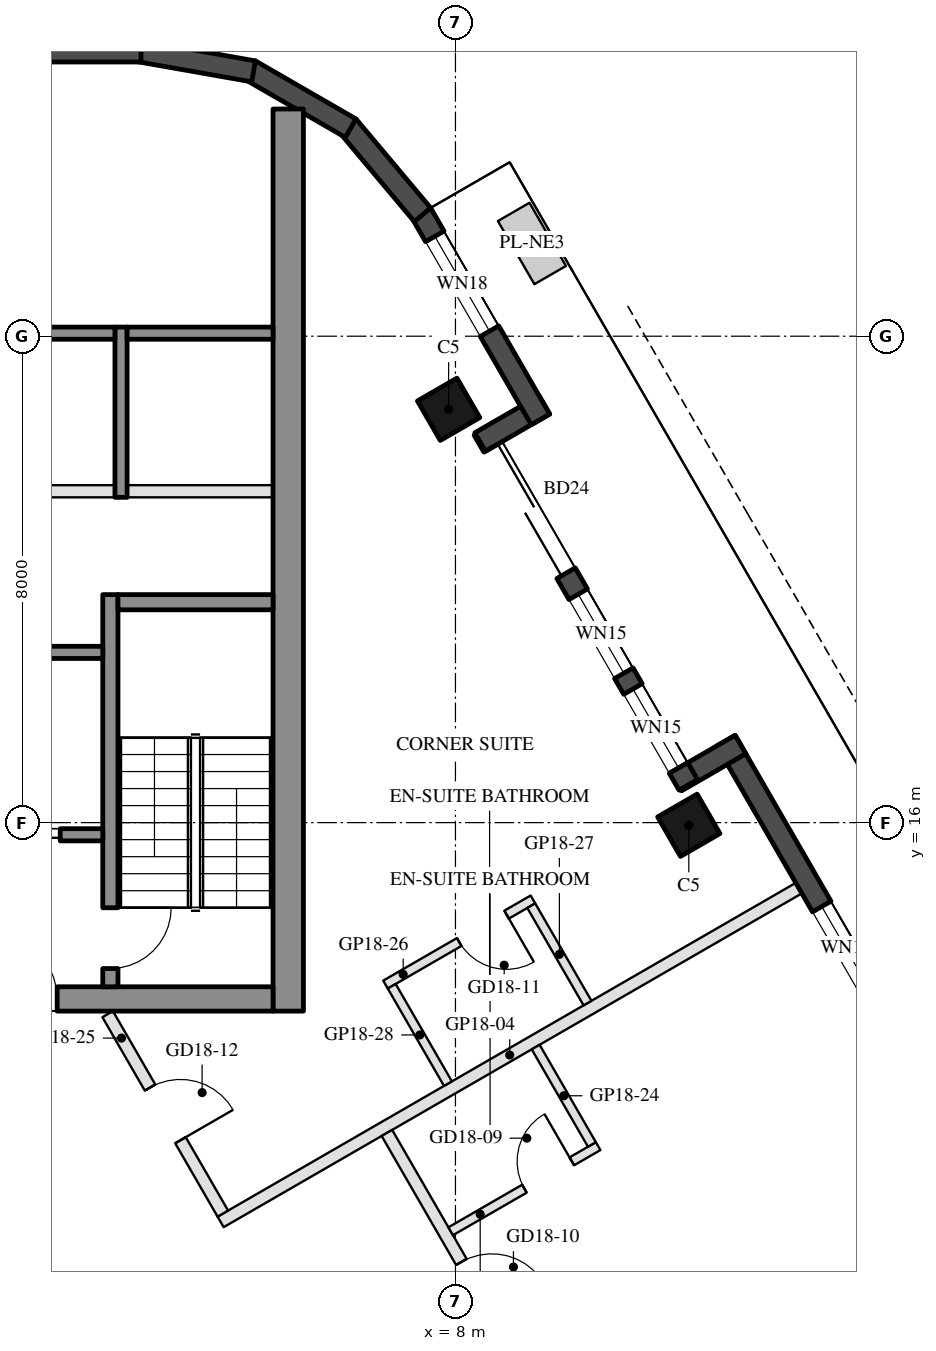
"""IFC4 building model, lengths in metres.
Left out: names, types, materials, properties, quantities, classifications, styles, units other than length and angle.
Written with IfcOpenShell. Run it as: python <this file> out.ifc"""

import sys

from ifc_helpers import new_model, si_unit, direction, frame, frame_2d, origin, origin_2d, place, context, subcontext, project, spatial, rectangle, hollow_rectangle, extrude, element, fill, save


model = new_model("IFC4")
c1 = context("Model", 3, precision=1e-05, world=origin(), true_north=direction((0.0, 1.0)))
c2 = subcontext(c1, "Body", "Model", "MODEL_VIEW")
j1 = project(units=[si_unit("LENGTHUNIT", "METRE"), si_unit("PLANEANGLEUNIT", "RADIAN")], contexts=[c1])
p1 = place(None, origin())
s1 = spatial("IfcSite", under=j1, at=p1, CompositionType="ELEMENT")
p2 = place(p1, origin())
s2 = spatial("IfcBuilding", under=s1, at=p2, CompositionType="ELEMENT")
p3 = place(p2, frame((0.0, 0.0, 194.7)))
s3 = spatial("IfcBuildingStorey", under=s2, at=p3, CompositionType="ELEMENT", Elevation=194.7)
for number, where, z_axis, x_axis in (
    (1, (11.838, 15.957, 0.0), (0.0, 0.0, 1.0), (-0.5, 0.866, 0.0)),
    (2, (7.888, 22.798, 0.0), (0.0, 0.0, 1.0), (-0.5, 0.866, 0.0)),
):
    element("IfcColumn", number, at=place(p3, frame(where, z_axis=z_axis, x_axis=x_axis)), inside=s3, PredefinedType="COLUMN", context=c2, shape_type="SweptSolid", body=[
        extrude(hollow_rectangle(XDim=0.75, YDim=0.75, WallThickness=0.035, at=origin_2d()), origin(), (0.0, 0.0, 1.0), 3.7),
    ])
p4 = place(p3, frame((17.299, 8.948, 0.0), z_axis=(0.0, 0.0, 1.0), x_axis=(-0.500010041276, 0.866019606374, 0.0)))
e3 = element("IfcWall", 3, at=p4, inside=s3, PredefinedType="SOLIDWALL", context=c2, shape_type="SweptSolid", body=[
    extrude(rectangle(XDim=9.7, YDim=0.35, at=frame_2d((4.85, 0.0))), origin(), (0.0, 0.0, 1.0), 3.55),
])
p5 = place(p4, frame((1.737, 0.0, 0.0)))
e4 = element("IfcOpeningElement", 4, at=p5, cuts=e3, PredefinedType="OPENING", context=c2, shape_type="SweptSolid", body=[
    extrude(rectangle(XDim=2.4, YDim=2.4, at=frame_2d((1.2, 1.2))), frame((0.0, 0.185, 0.0), z_axis=(0.0, -1.0, 0.0), x_axis=(1.0, 0.0, 0.0)), (0.0, 0.0, 1.0), 0.37),
])
p6 = place(p4, frame((4.949, 0.0, 0.3)))
e5 = element("IfcOpeningElement", 5, at=p6, cuts=e3, PredefinedType="OPENING", context=c2, shape_type="SweptSolid", body=[
    extrude(rectangle(XDim=1.6, YDim=2.65, at=frame_2d((0.8, 1.325))), frame((0.0, 0.185, 0.0), z_axis=(0.0, -1.0, 0.0), x_axis=(1.0, 0.0, 0.0)), (0.0, 0.0, 1.0), 0.37),
])
p7 = place(p3, frame((12.688, 17.284, 0.0), z_axis=(0.0, 0.0, 1.0), x_axis=(-0.865955602162, -0.500120880472, 0.0)))
e6 = element("IfcWall", 6, at=p7, inside=s3, PredefinedType="SOLIDWALL", context=c2, shape_type="SweptSolid", body=[
    extrude(rectangle(XDim=1.22, YDim=0.35, at=frame_2d((0.61, 0.0))), origin(), (0.0, 0.0, 1.0), 3.55),
])
p8 = place(p3, frame((11.829, 16.621, 0.0), z_axis=(0.0, 0.0, 1.0), x_axis=(-0.500003597184, 0.866023326939, 0.0)))
e7 = element("IfcWall", 7, at=p8, inside=s3, PredefinedType="SOLIDWALL", context=c2, shape_type="SweptSolid", body=[
    extrude(rectangle(XDim=6.74, YDim=0.35, at=frame_2d((3.37, 0.0))), origin(), (0.0, 0.0, 1.0), 3.55),
])
p9 = place(p8, frame((4.02, 0.0, 0.0)))
e8 = element("IfcOpeningElement", 8, at=p9, cuts=e7, PredefinedType="OPENING", context=c2, shape_type="SweptSolid", body=[
    extrude(rectangle(XDim=2.4, YDim=2.4, at=frame_2d((1.2, 1.2))), frame((0.0, 0.185, 0.0), z_axis=(0.0, -1.0, 0.0), x_axis=(1.0, 0.0, 0.0)), (0.0, 0.0, 1.0), 0.37),
])
p10 = place(p8, frame((0.32, 0.0, 0.3)))
e9 = element("IfcOpeningElement", 9, at=p10, cuts=e7, PredefinedType="OPENING", context=c2, shape_type="SweptSolid", body=[
    extrude(rectangle(XDim=1.5, YDim=2.65, at=frame_2d((0.75, 1.325))), frame((0.0, 0.185, 0.0), z_axis=(0.0, -1.0, 0.0), x_axis=(1.0, 0.0, 0.0)), (0.0, 0.0, 1.0), 0.37),
])
p11 = place(p8, frame((2.12, 0.0, 0.3)))
e10 = element("IfcOpeningElement", 10, at=p11, cuts=e7, PredefinedType="OPENING", context=c2, shape_type="SweptSolid", body=[
    extrude(rectangle(XDim=1.5, YDim=2.65, at=frame_2d((0.75, 1.325))), frame((0.0, 0.185, 0.0), z_axis=(0.0, -1.0, 0.0), x_axis=(1.0, 0.0, 0.0)), (0.0, 0.0, 1.0), 0.37),
])
p12 = place(p3, frame((8.406, 22.26, 0.0), z_axis=(0.0, 0.0, 1.0), x_axis=(0.865955602162, 0.500120880472, 0.0)))
e11 = element("IfcWall", 11, at=p12, inside=s3, PredefinedType="SOLIDWALL", context=c2, shape_type="SweptSolid", body=[
    extrude(rectangle(XDim=1.22, YDim=0.35, at=frame_2d((0.61, 0.0))), origin(), (0.0, 0.0, 1.0), 3.55),
])
p13 = place(p3, frame((9.398, 22.631, 0.0), z_axis=(0.0, 0.0, 1.0), x_axis=(-0.499954521343, 0.866051659307, 0.0)))
e12 = element("IfcWall", 12, at=p13, inside=s3, PredefinedType="SOLIDWALL", context=c2, shape_type="SweptSolid", body=[
    extrude(rectangle(XDim=3.916, YDim=0.35, at=frame_2d((1.958, 0.0))), origin(), (0.0, 0.0, 1.0), 3.55),
])
p14 = place(p13, frame((1.676, 0.0, 0.3)))
e13 = element("IfcOpeningElement", 13, at=p14, cuts=e12, PredefinedType="OPENING", context=c2, shape_type="SweptSolid", body=[
    extrude(rectangle(XDim=1.8, YDim=2.65, at=frame_2d((0.9, 1.325))), frame((0.0, 0.185, 0.0), z_axis=(0.0, -1.0, 0.0), x_axis=(1.0, 0.0, 0.0)), (0.0, 0.0, 1.0), 0.37),
])
p15 = place(p3, frame((7.458, 25.998, 0.0), z_axis=(0.0, 0.0, 1.0), x_axis=(-0.642808304945, 0.766027077259, 0.0)))
e14 = element("IfcWall", 14, at=p15, inside=s3, PredefinedType="SOLIDWALL", context=c2, shape_type="SweptSolid", body=[
    extrude(rectangle(XDim=1.91, YDim=0.35, at=frame_2d((0.955, 0.0))), origin(), (0.0, 0.0, 1.0), 3.55),
])
for number, where, z_axis, x_axis in (
    (15, (6.277, 27.422, 0.0), (0.0, 0.0, 1.0), (-0.866, 0.5, 0.0)),
    (16, (4.68, 28.356, 0.0), (0.0, 0.0, 1.0), (-0.985, 0.174, 0.0)),
):
    element("IfcWall", number, at=place(p3, frame(where, z_axis=z_axis, x_axis=x_axis)), inside=s3, PredefinedType="SOLIDWALL", context=c2, shape_type="SweptSolid", body=[
        extrude(rectangle(XDim=1.91, YDim=0.35, at=frame_2d((0.955, 0.0))), origin(), (0.0, 0.0, 1.0), 3.55),
    ])
p16 = place(p3, frame((2.829, 28.685, 0.0), z_axis=(0.0, 0.0, 1.0), x_axis=(-1.0, 0.0, 0.0)))
e17 = element("IfcWall", 17, at=p16, inside=s3, PredefinedType="SOLIDWALL", context=c2, shape_type="SweptSolid", body=[
    extrude(rectangle(XDim=5.658, YDim=0.35, at=frame_2d((2.829, 0.0))), origin(), (0.0, 0.0, 1.0), 3.55),
])
p17 = place(p3, frame((5.25, 12.9, 0.0), z_axis=(0.0, 0.0, 1.0), x_axis=(0.0, 1.0, 0.0)))
e18 = element("IfcWall", 18, at=p17, inside=s3, PredefinedType="SHEAR", context=c2, shape_type="SweptSolid", body=[
    extrude(rectangle(XDim=14.837, YDim=0.5, at=frame_2d((7.418, 0.0))), origin(), (0.0, 0.0, 1.0), 3.5),
])
p18 = place(p3, frame((5.0, 13.1, 0.0), z_axis=(0.0, 0.0, 1.0), x_axis=(-1.0, 0.0, 0.0)))
e19 = element("IfcWall", 19, at=p18, inside=s3, PredefinedType="SHEAR", context=c2, shape_type="SweptSolid", body=[
    extrude(rectangle(XDim=10.0, YDim=0.4, at=frame_2d((5.0, 0.0))), origin(), (0.0, 0.0, 1.0), 3.5),
])
p19 = place(p18, frame((3.55, 0.0, 0.0)))
e20 = element("IfcOpeningElement", 20, at=p19, cuts=e19, PredefinedType="OPENING", context=c2, shape_type="SweptSolid", body=[
    extrude(rectangle(XDim=1.1, YDim=2.1, at=frame_2d((0.55, 1.05))), frame((0.0, 0.21, 0.0), z_axis=(0.0, -1.0, 0.0), x_axis=(1.0, 0.0, 0.0)), (0.0, 0.0, 1.0), 0.42),
])
p20 = place(p18, frame((5.85, 0.0, 0.0)))
e21 = element("IfcOpeningElement", 21, at=p20, cuts=e19, PredefinedType="OPENING", context=c2, shape_type="SweptSolid", body=[
    extrude(rectangle(XDim=1.4, YDim=2.1, at=frame_2d((0.7, 1.05))), frame((0.0, 0.21, 0.0), z_axis=(0.0, -1.0, 0.0), x_axis=(1.0, 0.0, 0.0)), (0.0, 0.0, 1.0), 0.42),
])
p21 = place(p3, frame((2.325, 13.3, 0.0), z_axis=(0.0, 0.0, 1.0), x_axis=(0.0, 1.0, 0.0)))
e22 = element("IfcWall", 22, at=p21, inside=s3, PredefinedType="SHEAR", context=c2, shape_type="SweptSolid", body=[
    extrude(rectangle(XDim=6.45, YDim=0.25, at=frame_2d((3.225, 0.0))), origin(), (0.0, 0.0, 1.0), 3.5),
])
p22 = place(p21, frame((0.3, 0.0, 0.0)))
e23 = element("IfcOpeningElement", 23, at=p22, cuts=e22, PredefinedType="OPENING", context=c2, shape_type="SweptSolid", body=[
    extrude(rectangle(XDim=1.0, YDim=2.1, at=frame_2d((0.5, 1.05))), frame((0.0, 0.135, 0.0), z_axis=(0.0, -1.0, 0.0), x_axis=(1.0, 0.0, 0.0)), (0.0, 0.0, 1.0), 0.27),
])
p23 = place(p3, frame((5.0, 19.625, 0.0), z_axis=(0.0, 0.0, 1.0), x_axis=(-1.0, 0.0, 0.0)))
e24 = element("IfcWall", 24, at=p23, inside=s3, PredefinedType="SHEAR", context=c2, shape_type="SweptSolid", body=[
    extrude(rectangle(XDim=2.55, YDim=0.25, at=frame_2d((1.275, 0.0))), origin(), (0.0, 0.0, 1.0), 3.5),
])
p24 = place(p3, frame((2.2, 18.8, 0.0), z_axis=(0.0, 0.0, 1.0), x_axis=(-1.0, 0.0, 0.0)))
e25 = element("IfcWall", 25, at=p24, inside=s3, PredefinedType="SHEAR", context=c2, shape_type="SweptSolid", body=[
    extrude(rectangle(XDim=2.8, YDim=0.2, at=frame_2d((1.4, 0.0))), origin(), (0.0, 0.0, 1.0), 3.5),
])
p25 = place(p3, frame((2.2, 15.8, 0.0), z_axis=(0.0, 0.0, 1.0), x_axis=(-1.0, 0.0, 0.0)))
e26 = element("IfcWall", 26, at=p25, inside=s3, PredefinedType="SHEAR", context=c2, shape_type="SweptSolid", body=[
    extrude(rectangle(XDim=2.8, YDim=0.2, at=frame_2d((1.4, 0.0))), origin(), (0.0, 0.0, 1.0), 3.5),
])
p26 = place(p25, frame((0.7, 0.0, 0.0)))
e27 = element("IfcOpeningElement", 27, at=p26, cuts=e26, PredefinedType="OPENING", context=c2, shape_type="SweptSolid", body=[
    extrude(rectangle(XDim=1.2, YDim=2.1, at=frame_2d((0.6, 1.05))), frame((0.0, 0.11, 0.0), z_axis=(0.0, -1.0, 0.0), x_axis=(1.0, 0.0, 0.0)), (0.0, 0.0, 1.0), 0.22),
])
p27 = place(p3, frame((2.5, 21.35, 0.0), z_axis=(0.0, 0.0, 1.0), x_axis=(0.0, 1.0, 0.0)))
e28 = element("IfcWall", 28, at=p27, inside=s3, PredefinedType="SHEAR", context=c2, shape_type="SweptSolid", body=[
    extrude(rectangle(XDim=2.8, YDim=0.2, at=frame_2d((1.4, 0.0))), origin(), (0.0, 0.0, 1.0), 3.5),
])
p28 = place(p3, frame((5.0, 24.05, 0.0), z_axis=(0.0, 0.0, 1.0), x_axis=(-1.0, 0.0, 0.0)))
e29 = element("IfcWall", 29, at=p28, inside=s3, PredefinedType="SHEAR", context=c2, shape_type="SweptSolid", body=[
    extrude(rectangle(XDim=2.4, YDim=0.2, at=frame_2d((1.2, 0.0))), origin(), (0.0, 0.0, 1.0), 3.5),
])
p29 = place(p3, frame((2.4, 24.05, 0.0), z_axis=(0.0, 0.0, 1.0), x_axis=(-1.0, 0.0, 0.0)))
e30 = element("IfcWall", 30, at=p29, inside=s3, PredefinedType="SHEAR", context=c2, shape_type="SweptSolid", body=[
    extrude(rectangle(XDim=2.8, YDim=0.2, at=frame_2d((1.4, 0.0))), origin(), (0.0, 0.0, 1.0), 3.5),
])
p30 = place(p3, frame((5.0, 21.45, 0.0), z_axis=(0.0, 0.0, 1.0), x_axis=(-1.0, 0.0, 0.0)))
e31 = element("IfcWall", 31, at=p30, inside=s3, PredefinedType="PARTITIONING", context=c2, shape_type="SweptSolid", body=[
    extrude(rectangle(XDim=2.4, YDim=0.2, at=frame_2d((1.2, 0.0))), origin(), (0.0, 0.0, 1.0), 3.5),
])
p31 = place(p3, frame((2.4, 21.45, 0.0), z_axis=(0.0, 0.0, 1.0), x_axis=(-1.0, 0.0, 0.0)))
e32 = element("IfcWall", 32, at=p31, inside=s3, PredefinedType="PARTITIONING", context=c2, shape_type="SweptSolid", body=[
    extrude(rectangle(XDim=2.8, YDim=0.2, at=frame_2d((1.4, 0.0))), origin(), (0.0, 0.0, 1.0), 3.5),
])
p32 = place(p3, frame((13.647, 14.923, 0.0), z_axis=(0.0, 0.0, 1.0), x_axis=(-0.866027479907, -0.499996404033, 0.0)))
e33 = element("IfcWall", 33, at=p32, inside=s3, PredefinedType="PARTITIONING", context=c2, shape_type="SweptSolid", body=[
    extrude(rectangle(XDim=10.98, YDim=0.2, at=frame_2d((5.49, 0.0))), origin(), (0.0, 0.0, 1.0), 3.06),
])
p33 = place(p3, frame((6.873, 10.896, 0.0), z_axis=(0.0, 0.0, 1.0), x_axis=(0.499987518031, -0.866032610133, 0.0)))
e34 = element("IfcWall", 34, at=p33, inside=s3, PredefinedType="PARTITIONING", context=c2, shape_type="SweptSolid", body=[
    extrude(rectangle(XDim=9.886, YDim=0.2, at=frame_2d((4.943, 0.0))), origin(), (0.0, 0.0, 1.0), 2.95),
])
p34 = place(p33, frame((2.45, 0.0, 0.0)))
e35 = element("IfcOpeningElement", 35, at=p34, cuts=e34, PredefinedType="OPENING", context=c2, shape_type="SweptSolid", body=[
    extrude(rectangle(XDim=1.0, YDim=2.1, at=frame_2d((0.5, 1.05))), frame((0.0, 0.11, 0.0), z_axis=(0.0, -1.0, 0.0), x_axis=(1.0, 0.0, 0.0)), (0.0, 0.0, 1.0), 0.22),
])
p35 = place(p3, frame((7.922, 9.279, 0.0), z_axis=(0.0, 0.0, 1.0), x_axis=(0.865996816683, 0.500049511043, 0.0)))
e36 = element("IfcWall", 36, at=p35, inside=s3, PredefinedType="PARTITIONING", context=c2, shape_type="SweptSolid", body=[
    extrude(rectangle(XDim=2.8, YDim=0.15, at=frame_2d((1.4, 0.0))), origin(), (0.0, 0.0, 1.0), 2.95),
])
p36 = place(p35, frame((1.4, 0.0, 0.0)))
e37 = element("IfcOpeningElement", 37, at=p36, cuts=e36, PredefinedType="OPENING", context=c2, shape_type="SweptSolid", body=[
    extrude(rectangle(XDim=0.9, YDim=2.1, at=frame_2d((0.45, 1.05))), frame((0.0, 0.085, 0.0), z_axis=(0.0, -1.0, 0.0), x_axis=(1.0, 0.0, 0.0)), (0.0, 0.0, 1.0), 0.17),
])
p37 = place(p3, frame((10.244, 10.707, 0.0), z_axis=(0.0, 0.0, 1.0), x_axis=(-0.500042316284, 0.866000971088, 0.0)))
e38 = element("IfcWall", 38, at=p37, inside=s3, PredefinedType="PARTITIONING", context=c2, shape_type="SweptSolid", body=[
    extrude(rectangle(XDim=1.85, YDim=0.15, at=frame_2d((0.925, 0.0))), origin(), (0.0, 0.0, 1.0), 3.55),
])
p38 = place(p3, frame((2.281, 12.85, 0.0), z_axis=(0.0, 0.0, 1.0), x_axis=(0.499979074716, -0.866037484666, 0.0)))
e39 = element("IfcWall", 39, at=p38, inside=s3, PredefinedType="PARTITIONING", context=c2, shape_type="SweptSolid", body=[
    extrude(rectangle(XDim=3.788, YDim=0.2, at=frame_2d((1.894, 0.0))), origin(), (0.0, 0.0, 1.0), 2.95),
])
p39 = place(p38, frame((1.394, 0.0, 0.0)))
e40 = element("IfcOpeningElement", 40, at=p39, cuts=e39, PredefinedType="OPENING", context=c2, shape_type="SweptSolid", body=[
    extrude(rectangle(XDim=1.0, YDim=2.1, at=frame_2d((0.5, 1.05))), frame((0.0, 0.11, 0.0), z_axis=(0.0, -1.0, 0.0), x_axis=(1.0, 0.0, 0.0)), (0.0, 0.0, 1.0), 0.22),
])
p40 = place(p3, frame((9.274, 14.737, 0.0), z_axis=(0.0, 0.0, 1.0), x_axis=(-0.866018616679, -0.500011755427, 0.0)))
e41 = element("IfcWall", 41, at=p40, inside=s3, PredefinedType="PARTITIONING", context=c2, shape_type="SweptSolid", body=[
    extrude(rectangle(XDim=2.8, YDim=0.15, at=frame_2d((1.4, 0.0))), origin(), (0.0, 0.0, 1.0), 3.55),
])
p41 = place(p40, frame((0.5, 0.0, 0.0)))
e42 = element("IfcOpeningElement", 42, at=p41, cuts=e41, PredefinedType="OPENING", context=c2, shape_type="SweptSolid", body=[
    extrude(rectangle(XDim=0.9, YDim=2.1, at=frame_2d((0.45, 1.05))), frame((0.0, 0.085, 0.0), z_axis=(0.0, -1.0, 0.0), x_axis=(1.0, 0.0, 0.0)), (0.0, 0.0, 1.0), 0.17),
])
p42 = place(p3, frame((10.172, 13.032, 0.0), z_axis=(0.0, 0.0, 1.0), x_axis=(-0.500042316284, 0.866000971088, 0.0)))
e43 = element("IfcWall", 43, at=p42, inside=s3, PredefinedType="PARTITIONING", context=c2, shape_type="SweptSolid", body=[
    extrude(rectangle(XDim=1.85, YDim=0.15, at=frame_2d((0.925, 0.0))), origin(), (0.0, 0.0, 1.0), 2.95),
])
p43 = place(p3, frame((7.877, 11.707, 0.0), z_axis=(0.0, 0.0, 1.0), x_axis=(-0.499985172903, 0.866033964044, 0.0)))
e44 = element("IfcWall", 44, at=p43, inside=s3, PredefinedType="PARTITIONING", context=c2, shape_type="SweptSolid", body=[
    extrude(rectangle(XDim=1.85, YDim=0.15, at=frame_2d((0.925, 0.0))), origin(), (0.0, 0.0, 1.0), 2.95),
])
p44 = place(p6, origin())
e45 = element("IfcWindow", 45, at=p44, inside=s3, PartitioningType="SINGLE_PANEL", PredefinedType="WINDOW", context=c2, shape_type="SweptSolid", body=[
    extrude(rectangle(XDim=1.6, YDim=2.65, at=frame_2d((0.8, 1.325))), frame((0.0, 0.03, 0.0), z_axis=(0.0, -1.0, 0.0), x_axis=(1.0, 0.0, 0.0)), (0.0, 0.0, 1.0), 0.06),
])
fill(e5, e45)
p45 = place(p9, frame((2.4, 0.0, 0.0), z_axis=(0.0, 0.0, 1.0), x_axis=(-1.0, 0.0, 0.0)))
e46 = element("IfcDoor", 46, at=p45, inside=s3, OperationType="SLIDING_TO_LEFT", PredefinedType="DOOR", context=c2, shape_type="SweptSolid", body=[
    extrude(rectangle(XDim=2.4, YDim=2.4, at=frame_2d((1.2, 1.2))), frame((0.0, 0.025, 0.0), z_axis=(0.0, -1.0, 0.0), x_axis=(1.0, 0.0, 0.0)), (0.0, 0.0, 1.0), 0.05),
])
fill(e8, e46)
p46 = place(p10, origin())
e47 = element("IfcWindow", 47, at=p46, inside=s3, PartitioningType="SINGLE_PANEL", PredefinedType="WINDOW", context=c2, shape_type="SweptSolid", body=[
    extrude(rectangle(XDim=1.5, YDim=2.65, at=frame_2d((0.75, 1.325))), frame((0.0, 0.03, 0.0), z_axis=(0.0, -1.0, 0.0), x_axis=(1.0, 0.0, 0.0)), (0.0, 0.0, 1.0), 0.06),
])
fill(e9, e47)
p47 = place(p11, origin())
e48 = element("IfcWindow", 48, at=p47, inside=s3, PartitioningType="SINGLE_PANEL", PredefinedType="WINDOW", context=c2, shape_type="SweptSolid", body=[
    extrude(rectangle(XDim=1.5, YDim=2.65, at=frame_2d((0.75, 1.325))), frame((0.0, 0.03, 0.0), z_axis=(0.0, -1.0, 0.0), x_axis=(1.0, 0.0, 0.0)), (0.0, 0.0, 1.0), 0.06),
])
fill(e10, e48)
p48 = place(p14, origin())
e49 = element("IfcWindow", 49, at=p48, inside=s3, PartitioningType="SINGLE_PANEL", PredefinedType="WINDOW", context=c2, shape_type="SweptSolid", body=[
    extrude(rectangle(XDim=1.8, YDim=2.65, at=frame_2d((0.9, 1.325))), frame((0.0, 0.03, 0.0), z_axis=(0.0, -1.0, 0.0), x_axis=(1.0, 0.0, 0.0)), (0.0, 0.0, 1.0), 0.06),
])
fill(e13, e49)
p49 = place(p26, origin())
e50 = element("IfcDoor", 50, at=p49, inside=s3, OperationType="DOUBLE_DOOR_SLIDING", PredefinedType="DOOR", context=c2, shape_type="SweptSolid", body=[
    extrude(rectangle(XDim=1.2, YDim=2.1, at=frame_2d((0.6, 1.05))), frame((0.0, 0.025, 0.0), z_axis=(0.0, -1.0, 0.0), x_axis=(1.0, 0.0, 0.0)), (0.0, 0.0, 1.0), 0.05),
])
fill(e27, e50)
p50 = place(p19, frame((1.1, 0.0, 0.0), z_axis=(0.0, 0.0, 1.0), x_axis=(-1.0, 0.0, 0.0)))
e51 = element("IfcDoor", 51, at=p50, inside=s3, OperationType="SINGLE_SWING_LEFT", PredefinedType="DOOR", context=c2, shape_type="SweptSolid", body=[
    extrude(rectangle(XDim=1.1, YDim=2.1, at=frame_2d((0.55, 1.05))), frame((0.0, 0.025, 0.0), z_axis=(0.0, -1.0, 0.0), x_axis=(1.0, 0.0, 0.0)), (0.0, 0.0, 1.0), 0.05),
])
fill(e20, e51)
p51 = place(p22, frame((1.0, 0.0, 0.0), z_axis=(0.0, 0.0, 1.0), x_axis=(-1.0, 0.0, 0.0)))
e52 = element("IfcDoor", 52, at=p51, inside=s3, OperationType="SINGLE_SWING_LEFT", PredefinedType="DOOR", context=c2, shape_type="SweptSolid", body=[
    extrude(rectangle(XDim=1.0, YDim=2.1, at=frame_2d((0.5, 1.05))), frame((0.0, 0.025, 0.0), z_axis=(0.0, -1.0, 0.0), x_axis=(1.0, 0.0, 0.0)), (0.0, 0.0, 1.0), 0.05),
])
fill(e23, e52)
p52 = place(p36, origin())
e53 = element("IfcDoor", 53, at=p52, inside=s3, OperationType="SINGLE_SWING_RIGHT", PredefinedType="DOOR", context=c2, shape_type="SweptSolid", body=[
    extrude(rectangle(XDim=0.9, YDim=2.1, at=frame_2d((0.45, 1.05))), frame((0.0, 0.025, 0.0), z_axis=(0.0, -1.0, 0.0), x_axis=(1.0, 0.0, 0.0)), (0.0, 0.0, 1.0), 0.05),
])
fill(e37, e53)
p53 = place(p34, origin())
e54 = element("IfcDoor", 54, at=p53, inside=s3, OperationType="SINGLE_SWING_RIGHT", PredefinedType="DOOR", context=c2, shape_type="SweptSolid", body=[
    extrude(rectangle(XDim=1.0, YDim=2.1, at=frame_2d((0.5, 1.05))), frame((0.0, 0.025, 0.0), z_axis=(0.0, -1.0, 0.0), x_axis=(1.0, 0.0, 0.0)), (0.0, 0.0, 1.0), 0.05),
])
fill(e35, e54)
p54 = place(p41, origin())
e55 = element("IfcDoor", 55, at=p54, inside=s3, OperationType="SINGLE_SWING_LEFT", PredefinedType="DOOR", context=c2, shape_type="SweptSolid", body=[
    extrude(rectangle(XDim=0.9, YDim=2.1, at=frame_2d((0.45, 1.05))), frame((0.0, 0.025, 0.0), z_axis=(0.0, -1.0, 0.0), x_axis=(1.0, 0.0, 0.0)), (0.0, 0.0, 1.0), 0.05),
])
fill(e42, e55)
p55 = place(p39, origin())
e56 = element("IfcDoor", 56, at=p55, inside=s3, OperationType="SINGLE_SWING_RIGHT", PredefinedType="DOOR", context=c2, shape_type="SweptSolid", body=[
    extrude(rectangle(XDim=1.0, YDim=2.1, at=frame_2d((0.5, 1.05))), frame((0.0, 0.025, 0.0), z_axis=(0.0, -1.0, 0.0), x_axis=(1.0, 0.0, 0.0)), (0.0, 0.0, 1.0), 0.05),
])
fill(e40, e56)
save(model, sys.argv[1])
